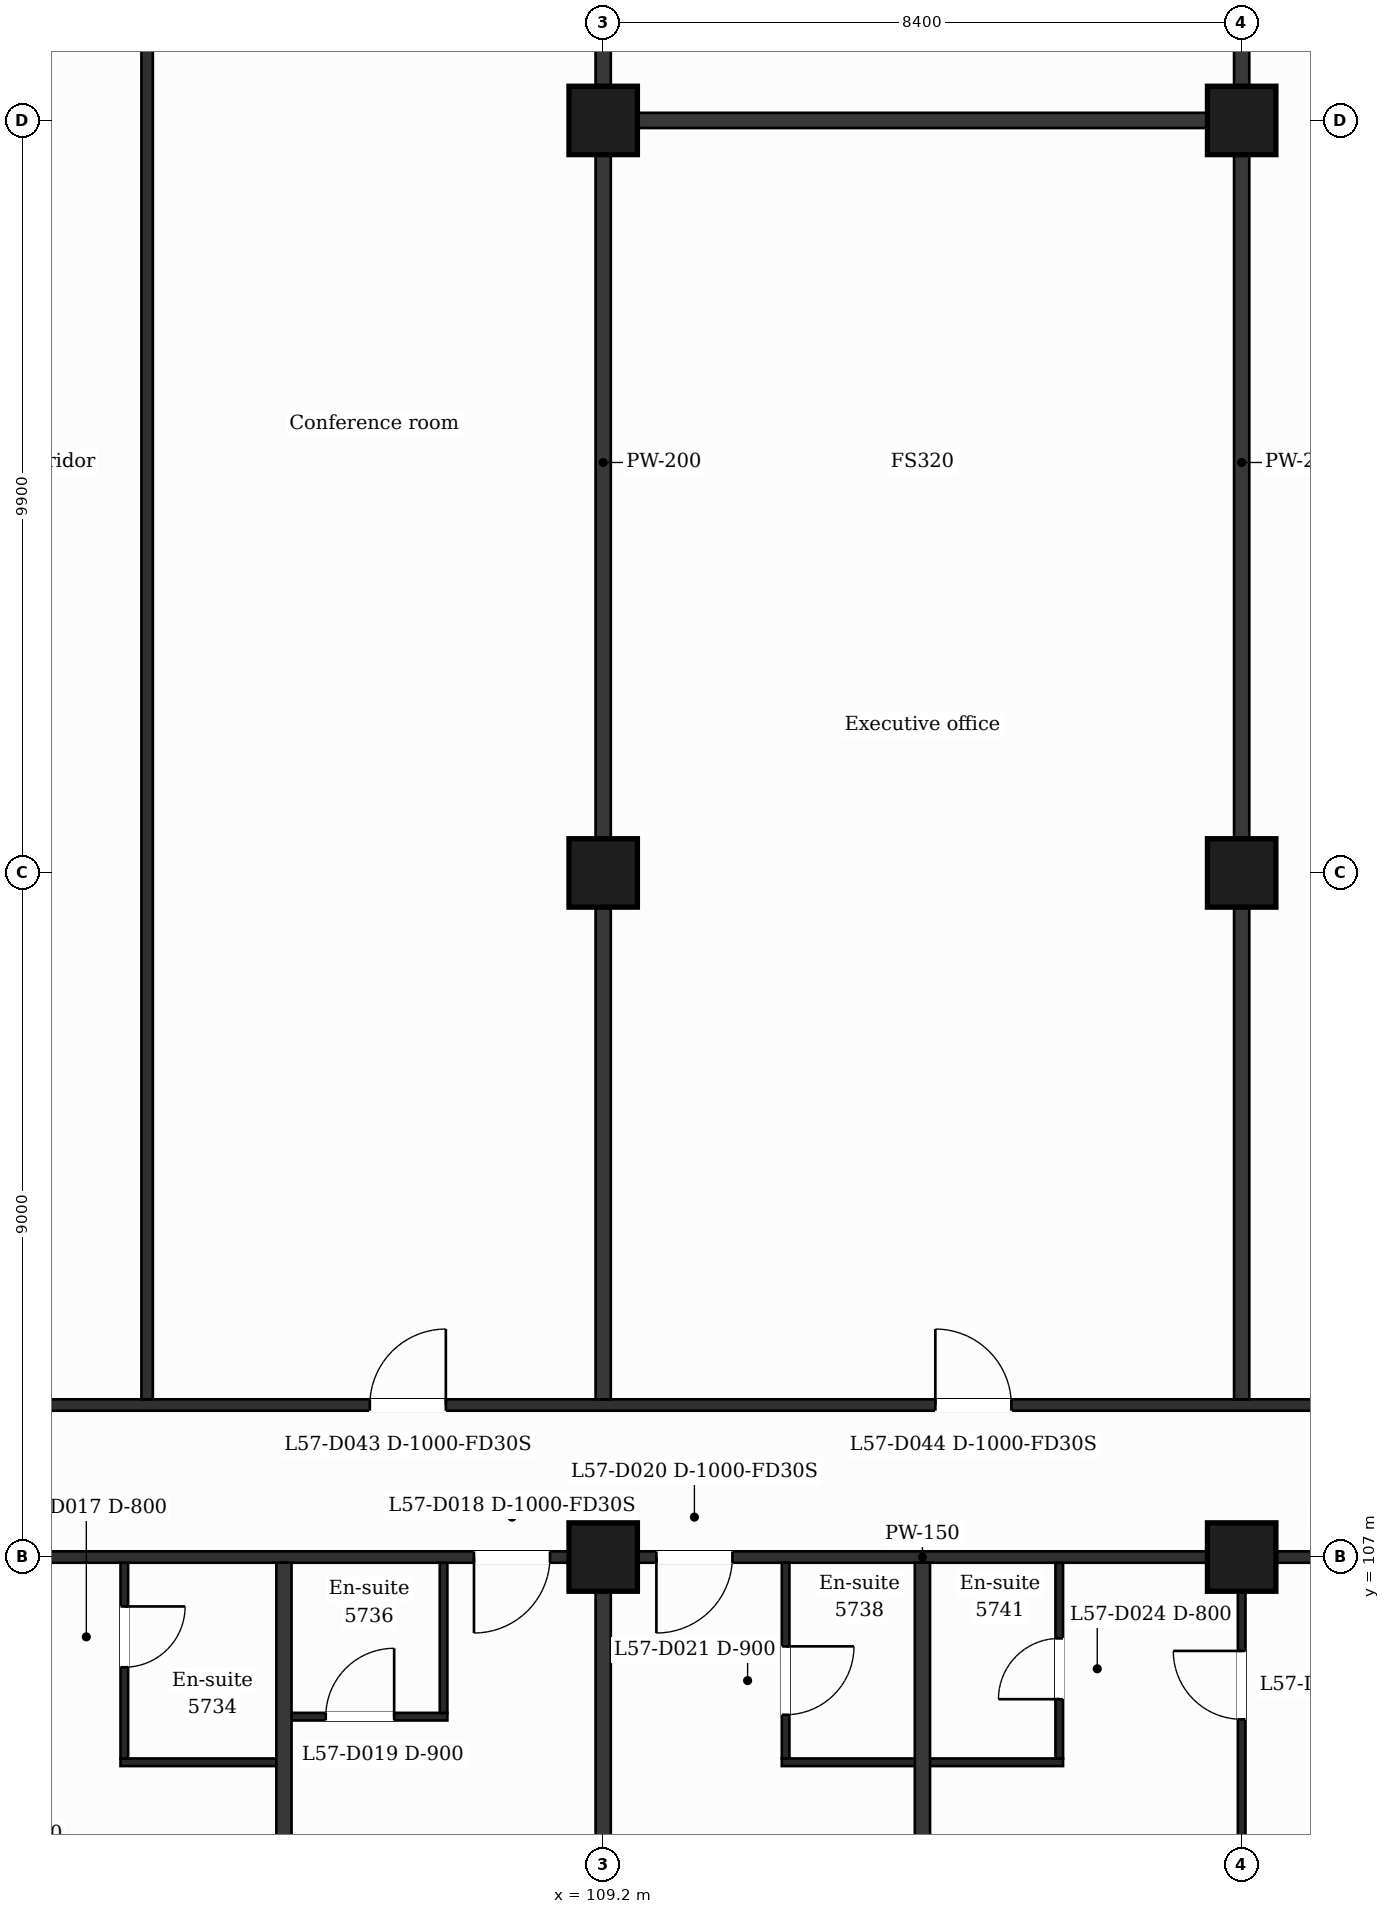
"""IFC4 building model, lengths in metres.
Left out: names, types, materials, properties, quantities, classifications, styles, units other than length and angle.
Written with IfcOpenShell. Run it as: python <this file> out.ifc"""

import sys

from ifc_helpers import new_model, si_unit, direction, frame, frame_2d, origin, origin_2d, place, context, subcontext, project, spatial, rectangle, extrude, element, fill, save


model = new_model("IFC4")
c1 = context("Model", 3, precision=1e-05, world=origin(), true_north=direction((0.0, 1.0)))
c2 = subcontext(c1, "Body", "Model", "MODEL_VIEW")
j1 = project(units=[si_unit("LENGTHUNIT", "METRE"), si_unit("PLANEANGLEUNIT", "RADIAN")], contexts=[c1])
p1 = place(None, origin())
s1 = spatial("IfcSite", under=j1, at=p1, CompositionType="ELEMENT")
p2 = place(p1, origin())
s2 = spatial("IfcBuilding", under=s1, at=p2, CompositionType="ELEMENT")
p3 = place(p2, frame((0.0, 0.0, 235.5)))
s3 = spatial("IfcBuildingStorey", under=s2, at=p3, CompositionType="ELEMENT", Elevation=235.5)
for number, where, z_axis, x_axis in (
    (1, (109.2, 107.0, 0.0), (0.0, 0.0, 1.0), (1.0, 0.0, 0.0)),
    (2, (117.6, 107.0, 0.0), (0.0, 0.0, 1.0), (1.0, 0.0, 0.0)),
    (3, (109.2, 116.0, 0.0), (0.0, 0.0, 1.0), (1.0, 0.0, 0.0)),
    (4, (117.6, 116.0, 0.0), (0.0, 0.0, 1.0), (1.0, 0.0, 0.0)),
    (5, (109.2, 125.9, 0.0), (0.0, 0.0, 1.0), (1.0, 0.0, 0.0)),
    (6, (117.6, 125.9, 0.0), (0.0, 0.0, 1.0), (1.0, 0.0, 0.0)),
):
    element("IfcColumn", number, at=place(p3, frame(where, z_axis=z_axis, x_axis=x_axis)), inside=s3, PredefinedType="COLUMN", context=c2, shape_type="SweptSolid", body=[
        extrude(rectangle(XDim=0.9, YDim=0.9, at=origin_2d()), origin(), (0.0, 0.0, 1.0), 3.7),
    ])
p4 = place(p3, frame((102.85, 104.3, 0.0), z_axis=(0.0, 0.0, 1.0), x_axis=(1.0, 0.0, 0.0)))
e7 = element("IfcWall", 7, at=p4, inside=s3, PredefinedType="PARTITIONING", context=c2, shape_type="SweptSolid", body=[
    extrude(rectangle(XDim=2.15, YDim=0.1, at=frame_2d((1.075, 0.0))), origin(), (0.0, 0.0, 1.0), 3.38),
])
p5 = place(p3, frame((111.55, 104.3, 0.0), z_axis=(0.0, 0.0, 1.0), x_axis=(1.0, 0.0, 0.0)))
e8 = element("IfcWall", 8, at=p5, inside=s3, PredefinedType="PARTITIONING", context=c2, shape_type="SweptSolid", body=[
    extrude(rectangle(XDim=3.7, YDim=0.1, at=frame_2d((1.85, 0.0))), origin(), (0.0, 0.0, 1.0), 3.38),
])
p6 = place(p3, frame((105.0, 104.9, 0.0), z_axis=(0.0, 0.0, 1.0), x_axis=(1.0, 0.0, 0.0)))
e9 = element("IfcWall", 9, at=p6, inside=s3, PredefinedType="PARTITIONING", context=c2, shape_type="SweptSolid", body=[
    extrude(rectangle(XDim=2.15, YDim=0.1, at=frame_2d((1.075, 0.0))), origin(), (0.0, 0.0, 1.0), 3.38),
])
p7 = place(p6, frame((0.55, 0.0, 0.0)))
e10 = element("IfcOpeningElement", 10, at=p7, cuts=e9, PredefinedType="OPENING", context=c2, shape_type="SweptSolid", body=[
    extrude(rectangle(XDim=0.9, YDim=2.1, at=frame_2d((0.45, 1.05))), frame((0.0, 0.06, 0.0), z_axis=(0.0, -1.0, 0.0), x_axis=(1.0, 0.0, 0.0)), (0.0, 0.0, 1.0), 0.12),
])
p8 = place(p3, frame((87.018, 107.0, 0.0), z_axis=(0.0, 0.0, 1.0), x_axis=(1.0, 0.0, 0.0)))
e11 = element("IfcWall", 11, at=p8, inside=s3, PredefinedType="PARTITIONING", context=c2, shape_type="SweptSolid", body=[
    extrude(rectangle(XDim=52.765, YDim=0.15, at=frame_2d((26.382, 0.0))), origin(), (0.0, 0.0, 1.0), 3.38),
])
p9 = place(p8, frame((0.707, 0.0, 0.0)))
e12 = element("IfcOpeningElement", 12, at=p9, cuts=e11, PredefinedType="OPENING", context=c2, shape_type="SweptSolid", body=[
    extrude(rectangle(XDim=0.95, YDim=2.1, at=frame_2d((0.475, 1.05))), frame((0.0, 0.085, 0.0), z_axis=(0.0, -1.0, 0.0), x_axis=(1.0, 0.0, 0.0)), (0.0, 0.0, 1.0), 0.17),
])
p10 = place(p8, frame((8.412, 0.0, 0.0)))
e13 = element("IfcOpeningElement", 13, at=p10, cuts=e11, PredefinedType="OPENING", context=c2, shape_type="SweptSolid", body=[
    extrude(rectangle(XDim=1.0, YDim=2.1, at=frame_2d((0.5, 1.05))), frame((0.0, 0.085, 0.0), z_axis=(0.0, -1.0, 0.0), x_axis=(1.0, 0.0, 0.0)), (0.0, 0.0, 1.0), 0.17),
])
p11 = place(p8, frame((20.482, 0.0, 0.0)))
e14 = element("IfcOpeningElement", 14, at=p11, cuts=e11, PredefinedType="OPENING", context=c2, shape_type="SweptSolid", body=[
    extrude(rectangle(XDim=1.0, YDim=2.1, at=frame_2d((0.5, 1.05))), frame((0.0, 0.085, 0.0), z_axis=(0.0, -1.0, 0.0), x_axis=(1.0, 0.0, 0.0)), (0.0, 0.0, 1.0), 0.17),
])
p12 = place(p8, frame((22.882, 0.0, 0.0)))
e15 = element("IfcOpeningElement", 15, at=p12, cuts=e11, PredefinedType="OPENING", context=c2, shape_type="SweptSolid", body=[
    extrude(rectangle(XDim=1.0, YDim=2.1, at=frame_2d((0.5, 1.05))), frame((0.0, 0.085, 0.0), z_axis=(0.0, -1.0, 0.0), x_axis=(1.0, 0.0, 0.0)), (0.0, 0.0, 1.0), 0.17),
])
p13 = place(p8, frame((32.607, 0.0, 0.0)))
e16 = element("IfcOpeningElement", 16, at=p13, cuts=e11, PredefinedType="OPENING", context=c2, shape_type="SweptSolid", body=[
    extrude(rectangle(XDim=1.0, YDim=2.1, at=frame_2d((0.5, 1.05))), frame((0.0, 0.085, 0.0), z_axis=(0.0, -1.0, 0.0), x_axis=(1.0, 0.0, 0.0)), (0.0, 0.0, 1.0), 0.17),
])
p14 = place(p8, frame((39.707, 0.0, 0.0)))
e17 = element("IfcOpeningElement", 17, at=p14, cuts=e11, PredefinedType="OPENING", context=c2, shape_type="SweptSolid", body=[
    extrude(rectangle(XDim=0.95, YDim=2.1, at=frame_2d((0.475, 1.05))), frame((0.0, 0.085, 0.0), z_axis=(0.0, -1.0, 0.0), x_axis=(1.0, 0.0, 0.0)), (0.0, 0.0, 1.0), 0.17),
])
p15 = place(p8, frame((43.457, 0.0, 0.0)))
e18 = element("IfcOpeningElement", 18, at=p15, cuts=e11, PredefinedType="OPENING", context=c2, shape_type="SweptSolid", body=[
    extrude(rectangle(XDim=0.95, YDim=2.1, at=frame_2d((0.475, 1.05))), frame((0.0, 0.085, 0.0), z_axis=(0.0, -1.0, 0.0), x_axis=(1.0, 0.0, 0.0)), (0.0, 0.0, 1.0), 0.17),
])
p16 = place(p8, frame((49.285, 0.0, 0.0)))
e19 = element("IfcOpeningElement", 19, at=p16, cuts=e11, PredefinedType="OPENING", context=c2, shape_type="SweptSolid", body=[
    extrude(rectangle(XDim=0.95, YDim=2.1, at=frame_2d((0.475, 1.05))), frame((0.0, 0.085, 0.0), z_axis=(0.0, -1.0, 0.0), x_axis=(1.0, 0.0, 0.0)), (0.0, 0.0, 1.0), 0.17),
])
p17 = place(p3, frame((100.725, 109.0, 0.0), z_axis=(0.0, 0.0, 1.0), x_axis=(1.0, 0.0, 0.0)))
e20 = element("IfcWall", 20, at=p17, inside=s3, PredefinedType="PARTITIONING", context=c2, shape_type="SweptSolid", body=[
    extrude(rectangle(XDim=25.35, YDim=0.15, at=frame_2d((12.675, 0.0))), origin(), (0.0, 0.0, 1.0), 3.38),
])
p18 = place(p17, frame((5.405, 0.0, 0.0)))
e21 = element("IfcOpeningElement", 21, at=p18, cuts=e20, PredefinedType="OPENING", context=c2, shape_type="SweptSolid", body=[
    extrude(rectangle(XDim=1.0, YDim=2.1, at=frame_2d((0.5, 1.05))), frame((0.0, 0.085, 0.0), z_axis=(0.0, -1.0, 0.0), x_axis=(1.0, 0.0, 0.0)), (0.0, 0.0, 1.0), 0.17),
])
p19 = place(p17, frame((12.845, 0.0, 0.0)))
e22 = element("IfcOpeningElement", 22, at=p19, cuts=e20, PredefinedType="OPENING", context=c2, shape_type="SweptSolid", body=[
    extrude(rectangle(XDim=1.0, YDim=2.1, at=frame_2d((0.5, 1.05))), frame((0.0, 0.085, 0.0), z_axis=(0.0, -1.0, 0.0), x_axis=(1.0, 0.0, 0.0)), (0.0, 0.0, 1.0), 0.17),
])
p20 = place(p17, frame((19.805, 0.0, 0.0)))
e23 = element("IfcOpeningElement", 23, at=p20, cuts=e20, PredefinedType="OPENING", context=c2, shape_type="SweptSolid", body=[
    extrude(rectangle(XDim=1.0, YDim=2.1, at=frame_2d((0.5, 1.05))), frame((0.0, 0.085, 0.0), z_axis=(0.0, -1.0, 0.0), x_axis=(1.0, 0.0, 0.0)), (0.0, 0.0, 1.0), 0.17),
])
p21 = place(p3, frame((109.2, 125.9, 0.0), z_axis=(0.0, 0.0, 1.0), x_axis=(1.0, 0.0, 0.0)))
e24 = element("IfcWall", 24, at=p21, inside=s3, PredefinedType="PARTITIONING", context=c2, shape_type="SweptSolid", body=[
    extrude(rectangle(XDim=8.4, YDim=0.2, at=frame_2d((4.2, 0.0))), origin(), (0.0, 0.0, 1.0), 3.38),
])
p22 = place(p3, frame((102.9, 104.35, 0.0), z_axis=(0.0, 0.0, 1.0), x_axis=(0.0, 1.0, 0.0)))
e25 = element("IfcWall", 25, at=p22, inside=s3, PredefinedType="PARTITIONING", context=c2, shape_type="SweptSolid", body=[
    extrude(rectangle(XDim=2.575, YDim=0.1, at=frame_2d((1.288, 0.0))), origin(), (0.0, 0.0, 1.0), 3.38),
])
p23 = place(p22, frame((1.2, 0.0, 0.0)))
e26 = element("IfcOpeningElement", 26, at=p23, cuts=e25, PredefinedType="OPENING", context=c2, shape_type="SweptSolid", body=[
    extrude(rectangle(XDim=0.8, YDim=2.1, at=frame_2d((0.4, 1.05))), frame((0.0, 0.06, 0.0), z_axis=(0.0, -1.0, 0.0), x_axis=(1.0, 0.0, 0.0)), (0.0, 0.0, 1.0), 0.12),
])
p24 = place(p3, frame((103.2, 109.075, 0.0), z_axis=(0.0, 0.0, 1.0), x_axis=(0.0, 1.0, 0.0)))
e27 = element("IfcWall", 27, at=p24, inside=s3, PredefinedType="PARTITIONING", context=c2, shape_type="SweptSolid", body=[
    extrude(rectangle(XDim=24.65, YDim=0.15, at=frame_2d((12.325, 0.0))), origin(), (0.0, 0.0, 1.0), 3.38),
])
p25 = place(p3, frame((105.0, 99.79, 0.0), z_axis=(0.0, 0.0, 1.0), x_axis=(0.0, 1.0, 0.0)))
e28 = element("IfcWall", 28, at=p25, inside=s3, PredefinedType="PARTITIONING", context=c2, shape_type="SweptSolid", body=[
    extrude(rectangle(XDim=7.135, YDim=0.2, at=frame_2d((3.567, 0.0))), origin(), (0.0, 0.0, 1.0), 3.38),
])
p26 = place(p3, frame((107.1, 104.95, 0.0), z_axis=(0.0, 0.0, 1.0), x_axis=(0.0, 1.0, 0.0)))
e29 = element("IfcWall", 29, at=p26, inside=s3, PredefinedType="PARTITIONING", context=c2, shape_type="SweptSolid", body=[
    extrude(rectangle(XDim=1.975, YDim=0.1, at=frame_2d((0.988, 0.0))), origin(), (0.0, 0.0, 1.0), 3.38),
])
p27 = place(p3, frame((109.2, 99.79, 0.0), z_axis=(0.0, 0.0, 1.0), x_axis=(0.0, 1.0, 0.0)))
e30 = element("IfcWall", 30, at=p27, inside=s3, PredefinedType="PARTITIONING", context=c2, shape_type="SweptSolid", body=[
    extrude(rectangle(XDim=7.135, YDim=0.2, at=frame_2d((3.567, 0.0))), origin(), (0.0, 0.0, 1.0), 3.38),
])
p28 = place(p3, frame((109.2, 109.075, 0.0), z_axis=(0.0, 0.0, 1.0), x_axis=(0.0, 1.0, 0.0)))
e31 = element("IfcWall", 31, at=p28, inside=s3, PredefinedType="PARTITIONING", context=c2, shape_type="SweptSolid", body=[
    extrude(rectangle(XDim=24.65, YDim=0.2, at=frame_2d((12.325, 0.0))), origin(), (0.0, 0.0, 1.0), 3.38),
])
p29 = place(p3, frame((111.6, 104.35, 0.0), z_axis=(0.0, 0.0, 1.0), x_axis=(0.0, 1.0, 0.0)))
e32 = element("IfcWall", 32, at=p29, inside=s3, PredefinedType="PARTITIONING", context=c2, shape_type="SweptSolid", body=[
    extrude(rectangle(XDim=2.575, YDim=0.1, at=frame_2d((1.288, 0.0))), origin(), (0.0, 0.0, 1.0), 3.38),
])
p30 = place(p29, frame((0.575, 0.0, 0.0)))
e33 = element("IfcOpeningElement", 33, at=p30, cuts=e32, PredefinedType="OPENING", context=c2, shape_type="SweptSolid", body=[
    extrude(rectangle(XDim=0.9, YDim=2.1, at=frame_2d((0.45, 1.05))), frame((0.0, 0.06, 0.0), z_axis=(0.0, -1.0, 0.0), x_axis=(1.0, 0.0, 0.0)), (0.0, 0.0, 1.0), 0.12),
])
p31 = place(p3, frame((113.4, 99.79, 0.0), z_axis=(0.0, 0.0, 1.0), x_axis=(0.0, 1.0, 0.0)))
e34 = element("IfcWall", 34, at=p31, inside=s3, PredefinedType="PARTITIONING", context=c2, shape_type="SweptSolid", body=[
    extrude(rectangle(XDim=7.135, YDim=0.2, at=frame_2d((3.567, 0.0))), origin(), (0.0, 0.0, 1.0), 3.38),
])
p32 = place(p3, frame((115.2, 104.35, 0.0), z_axis=(0.0, 0.0, 1.0), x_axis=(0.0, 1.0, 0.0)))
e35 = element("IfcWall", 35, at=p32, inside=s3, PredefinedType="PARTITIONING", context=c2, shape_type="SweptSolid", body=[
    extrude(rectangle(XDim=2.575, YDim=0.1, at=frame_2d((1.288, 0.0))), origin(), (0.0, 0.0, 1.0), 3.38),
])
p33 = place(p32, frame((0.78, 0.0, 0.0)))
e36 = element("IfcOpeningElement", 36, at=p33, cuts=e35, PredefinedType="OPENING", context=c2, shape_type="SweptSolid", body=[
    extrude(rectangle(XDim=0.8, YDim=2.1, at=frame_2d((0.4, 1.05))), frame((0.0, 0.06, 0.0), z_axis=(0.0, -1.0, 0.0), x_axis=(1.0, 0.0, 0.0)), (0.0, 0.0, 1.0), 0.12),
])
p34 = place(p3, frame((117.6, 99.79, 0.0), z_axis=(0.0, 0.0, 1.0), x_axis=(0.0, 1.0, 0.0)))
e37 = element("IfcWall", 37, at=p34, inside=s3, PredefinedType="PARTITIONING", context=c2, shape_type="SweptSolid", body=[
    extrude(rectangle(XDim=7.135, YDim=0.1, at=frame_2d((3.567, 0.0))), origin(), (0.0, 0.0, 1.0), 3.38),
])
p35 = place(p34, frame((5.075, 0.0, 0.0)))
e38 = element("IfcOpeningElement", 38, at=p35, cuts=e37, PredefinedType="OPENING", context=c2, shape_type="SweptSolid", body=[
    extrude(rectangle(XDim=0.9, YDim=2.1, at=frame_2d((0.45, 1.05))), frame((0.0, 0.06, 0.0), z_axis=(0.0, -1.0, 0.0), x_axis=(1.0, 0.0, 0.0)), (0.0, 0.0, 1.0), 0.12),
])
p36 = place(p3, frame((117.6, 109.075, 0.0), z_axis=(0.0, 0.0, 1.0), x_axis=(0.0, 1.0, 0.0)))
e39 = element("IfcWall", 39, at=p36, inside=s3, PredefinedType="PARTITIONING", context=c2, shape_type="SweptSolid", body=[
    extrude(rectangle(XDim=24.65, YDim=0.2, at=frame_2d((12.325, 0.0))), origin(), (0.0, 0.0, 1.0), 3.38),
])
p37 = place(p23, origin())
e40 = element("IfcDoor", 40, at=p37, inside=s3, OperationType="SINGLE_SWING_RIGHT", PredefinedType="DOOR", context=c2, shape_type="SweptSolid", body=[
    extrude(rectangle(XDim=0.8, YDim=2.1, at=frame_2d((0.4, 1.05))), frame((0.0, 0.025, 0.0), z_axis=(0.0, -1.0, 0.0), x_axis=(1.0, 0.0, 0.0)), (0.0, 0.0, 1.0), 0.05),
])
fill(e26, e40)
p38 = place(p11, origin())
e41 = element("IfcDoor", 41, at=p38, inside=s3, OperationType="SINGLE_SWING_LEFT", PredefinedType="DOOR", context=c2, shape_type="SweptSolid", body=[
    extrude(rectangle(XDim=1.0, YDim=2.1, at=frame_2d((0.5, 1.05))), frame((0.0, 0.025, 0.0), z_axis=(0.0, -1.0, 0.0), x_axis=(1.0, 0.0, 0.0)), (0.0, 0.0, 1.0), 0.05),
])
fill(e14, e41)
p39 = place(p7, origin())
e42 = element("IfcDoor", 42, at=p39, inside=s3, OperationType="SINGLE_SWING_RIGHT", PredefinedType="DOOR", context=c2, shape_type="SweptSolid", body=[
    extrude(rectangle(XDim=0.9, YDim=2.1, at=frame_2d((0.45, 1.05))), frame((0.0, 0.025, 0.0), z_axis=(0.0, -1.0, 0.0), x_axis=(1.0, 0.0, 0.0)), (0.0, 0.0, 1.0), 0.05),
])
fill(e10, e42)
p40 = place(p12, origin())
e43 = element("IfcDoor", 43, at=p40, inside=s3, OperationType="SINGLE_SWING_LEFT", PredefinedType="DOOR", context=c2, shape_type="SweptSolid", body=[
    extrude(rectangle(XDim=1.0, YDim=2.1, at=frame_2d((0.5, 1.05))), frame((0.0, 0.025, 0.0), z_axis=(0.0, -1.0, 0.0), x_axis=(1.0, 0.0, 0.0)), (0.0, 0.0, 1.0), 0.05),
])
fill(e15, e43)
p41 = place(p30, origin())
e44 = element("IfcDoor", 44, at=p41, inside=s3, OperationType="SINGLE_SWING_RIGHT", PredefinedType="DOOR", context=c2, shape_type="SweptSolid", body=[
    extrude(rectangle(XDim=0.9, YDim=2.1, at=frame_2d((0.45, 1.05))), frame((0.0, 0.025, 0.0), z_axis=(0.0, -1.0, 0.0), x_axis=(1.0, 0.0, 0.0)), (0.0, 0.0, 1.0), 0.05),
])
fill(e33, e44)
p42 = place(p35, origin())
e45 = element("IfcDoor", 45, at=p42, inside=s3, OperationType="SINGLE_SWING_RIGHT", PredefinedType="DOOR", context=c2, shape_type="SweptSolid", body=[
    extrude(rectangle(XDim=0.9, YDim=2.1, at=frame_2d((0.45, 1.05))), frame((0.0, 0.025, 0.0), z_axis=(0.0, -1.0, 0.0), x_axis=(1.0, 0.0, 0.0)), (0.0, 0.0, 1.0), 0.05),
])
fill(e38, e45)
p43 = place(p33, origin())
e46 = element("IfcDoor", 46, at=p43, inside=s3, OperationType="SINGLE_SWING_LEFT", PredefinedType="DOOR", context=c2, shape_type="SweptSolid", body=[
    extrude(rectangle(XDim=0.8, YDim=2.1, at=frame_2d((0.4, 1.05))), frame((0.0, 0.025, 0.0), z_axis=(0.0, -1.0, 0.0), x_axis=(1.0, 0.0, 0.0)), (0.0, 0.0, 1.0), 0.05),
])
fill(e36, e46)
p44 = place(p18, origin())
e47 = element("IfcDoor", 47, at=p44, inside=s3, OperationType="SINGLE_SWING_RIGHT", PredefinedType="DOOR", context=c2, shape_type="SweptSolid", body=[
    extrude(rectangle(XDim=1.0, YDim=2.1, at=frame_2d((0.5, 1.05))), frame((0.0, 0.025, 0.0), z_axis=(0.0, -1.0, 0.0), x_axis=(1.0, 0.0, 0.0)), (0.0, 0.0, 1.0), 0.05),
])
fill(e21, e47)
p45 = place(p19, origin())
e48 = element("IfcDoor", 48, at=p45, inside=s3, OperationType="SINGLE_SWING_LEFT", PredefinedType="DOOR", context=c2, shape_type="SweptSolid", body=[
    extrude(rectangle(XDim=1.0, YDim=2.1, at=frame_2d((0.5, 1.05))), frame((0.0, 0.025, 0.0), z_axis=(0.0, -1.0, 0.0), x_axis=(1.0, 0.0, 0.0)), (0.0, 0.0, 1.0), 0.05),
])
fill(e22, e48)
save(model, sys.argv[1])
